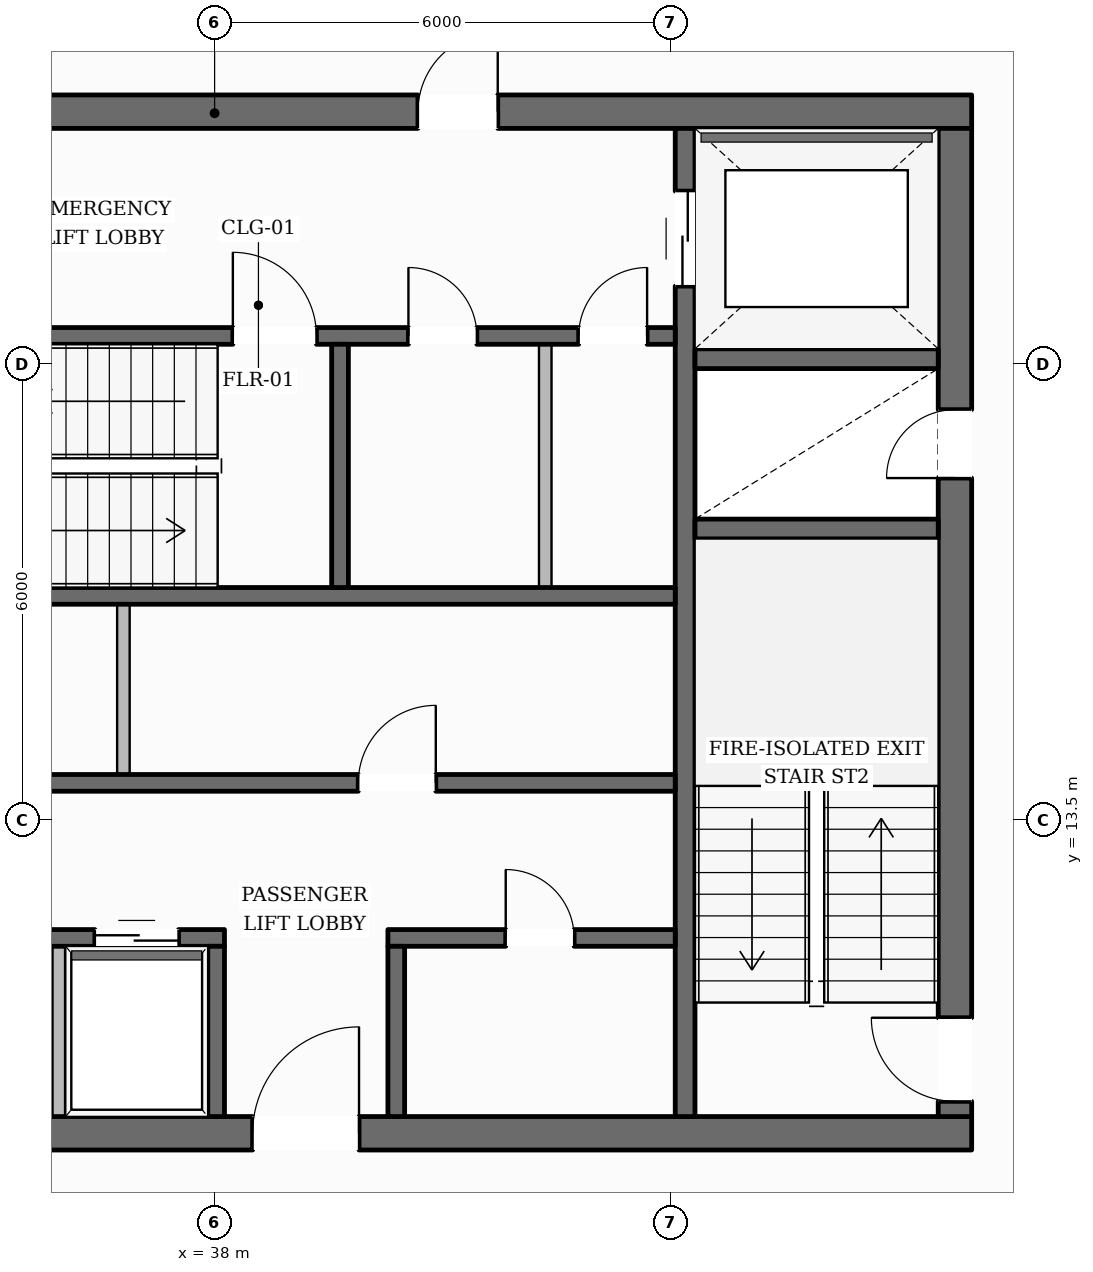
"""IFC4 building model, lengths in metres.
Left out: names, types, materials, properties, quantities, classifications, styles, units other than length and angle.
Written with IfcOpenShell. Run it as: python <this file> out.ifc"""

import sys

from ifc_helpers import new_model, si_unit, direction, frame, frame_2d, origin, place, context, subcontext, project, spatial, rectangle, extrude, element, fill, save


model = new_model("IFC4")
c1 = context("Model", 3, precision=1e-05, world=origin(), true_north=direction((0.0, 1.0)))
c2 = subcontext(c1, "Body", "Model", "MODEL_VIEW")
j1 = project(units=[si_unit("LENGTHUNIT", "METRE"), si_unit("PLANEANGLEUNIT", "RADIAN")], contexts=[c1])
p1 = place(None, origin())
s1 = spatial("IfcSite", under=j1, at=p1, CompositionType="ELEMENT")
p2 = place(p1, origin())
s2 = spatial("IfcBuilding", under=s1, at=p2, CompositionType="ELEMENT")
p3 = place(p2, frame((0.0, 0.0, 180.4)))
s3 = spatial("IfcBuildingStorey", under=s2, at=p3, CompositionType="ELEMENT", Elevation=180.4)
p4 = place(p3, frame((28.04, 9.38, 0.0), z_axis=(0.0, 0.0, 1.0), x_axis=(1.0, 0.0, 0.0)))
e1 = element("IfcWall", 1, at=p4, inside=s3, PredefinedType="SOLIDWALL", context=c2, shape_type="SweptSolid", body=[
    extrude(rectangle(XDim=19.92, YDim=0.44, at=frame_2d((9.96, 0.0))), origin(), (0.0, 0.0, 1.0), 3.6),
])
p5 = place(p4, frame((10.46, 0.0, 0.0)))
e2 = element("IfcOpeningElement", 2, at=p5, cuts=e1, PredefinedType="OPENING", context=c2, shape_type="SweptSolid", body=[
    extrude(rectangle(XDim=1.4, YDim=2.2, at=frame_2d((0.7, 1.1))), frame((0.0, 0.23, 0.0), z_axis=(0.0, -1.0, 0.0), x_axis=(1.0, 0.0, 0.0)), (0.0, 0.0, 1.0), 0.46),
])
p6 = place(p3, frame((28.04, 22.82, 0.0), z_axis=(0.0, 0.0, 1.0), x_axis=(1.0, 0.0, 0.0)))
e3 = element("IfcWall", 3, at=p6, inside=s3, PredefinedType="SOLIDWALL", context=c2, shape_type="SweptSolid", body=[
    extrude(rectangle(XDim=19.92, YDim=0.44, at=frame_2d((9.96, 0.0))), origin(), (0.0, 0.0, 1.0), 3.6),
])
p7 = place(p6, frame((6.235, 0.0, 0.0)))
e4 = element("IfcOpeningElement", 4, at=p7, cuts=e3, PredefinedType="OPENING", context=c2, shape_type="SweptSolid", body=[
    extrude(rectangle(XDim=1.05, YDim=2.15, at=frame_2d((0.525, 1.075))), frame((0.0, 0.23, 0.0), z_axis=(0.0, -1.0, 0.0), x_axis=(1.0, 0.0, 0.0)), (0.0, 0.0, 1.0), 0.46),
])
p8 = place(p6, frame((12.635, 0.0, 0.0)))
e5 = element("IfcOpeningElement", 5, at=p8, cuts=e3, PredefinedType="OPENING", context=c2, shape_type="SweptSolid", body=[
    extrude(rectangle(XDim=1.05, YDim=2.15, at=frame_2d((0.525, 1.075))), frame((0.0, 0.23, 0.0), z_axis=(0.0, -1.0, 0.0), x_axis=(1.0, 0.0, 0.0)), (0.0, 0.0, 1.0), 0.46),
])
p9 = place(p3, frame((47.74, 9.6, 0.0), z_axis=(0.0, 0.0, 1.0), x_axis=(0.0, 1.0, 0.0)))
e6 = element("IfcWall", 6, at=p9, inside=s3, PredefinedType="SOLIDWALL", context=c2, shape_type="SweptSolid", body=[
    extrude(rectangle(XDim=13.0, YDim=0.44, at=frame_2d((6.5, 0.0))), origin(), (0.0, 0.0, 1.0), 3.6),
])
p10 = place(p9, frame((0.2, 0.0, 0.0)))
e7 = element("IfcOpeningElement", 7, at=p10, cuts=e6, PredefinedType="OPENING", context=c2, shape_type="SweptSolid", body=[
    extrude(rectangle(XDim=1.1, YDim=2.15, at=frame_2d((0.55, 1.075))), frame((0.0, 0.23, 0.0), z_axis=(0.0, -1.0, 0.0), x_axis=(1.0, 0.0, 0.0)), (0.0, 0.0, 1.0), 0.46),
])
p11 = place(p9, frame((8.4, 0.0, 0.0)))
e8 = element("IfcOpeningElement", 8, at=p11, cuts=e6, PredefinedType="OPENING", context=c2, shape_type="SweptSolid", body=[
    extrude(rectangle(XDim=0.9, YDim=2.1, at=frame_2d((0.45, 1.05))), frame((0.0, 0.23, 0.0), z_axis=(0.0, -1.0, 0.0), x_axis=(1.0, 0.0, 0.0)), (0.0, 0.0, 1.0), 0.46),
])
p12 = place(p3, frame((44.19, 9.6, 0.0), z_axis=(0.0, 0.0, 1.0), x_axis=(0.0, 1.0, 0.0)))
e9 = element("IfcWall", 9, at=p12, inside=s3, PredefinedType="SHEAR", context=c2, shape_type="SweptSolid", body=[
    extrude(rectangle(XDim=13.0, YDim=0.26, at=frame_2d((6.5, 0.0))), origin(), (0.0, 0.0, 1.0), 3.6),
])
p13 = place(p12, frame((10.925, 0.0, 0.0)))
e10 = element("IfcOpeningElement", 10, at=p13, cuts=e9, PredefinedType="OPENING", context=c2, shape_type="SweptSolid", body=[
    extrude(rectangle(XDim=1.25, YDim=2.25, at=frame_2d((0.625, 1.125))), frame((0.0, 0.14, 0.0), z_axis=(0.0, -1.0, 0.0), x_axis=(1.0, 0.0, 0.0)), (0.0, 0.0, 1.0), 0.28),
])
for number, where, z_axis, x_axis in (
    (11, (44.32, 17.33, 0.0), (0.0, 0.0, 1.0), (1.0, 0.0, 0.0)),
    (12, (44.32, 19.57, 0.0), (0.0, 0.0, 1.0), (1.0, 0.0, 0.0)),
):
    element("IfcWall", number, at=place(p3, frame(where, z_axis=z_axis, x_axis=x_axis)), inside=s3, PredefinedType="SHEAR", context=c2, shape_type="SweptSolid", body=[
        extrude(rectangle(XDim=3.2, YDim=0.26, at=frame_2d((1.6, 0.0))), origin(), (0.0, 0.0, 1.0), 3.6),
    ])
p14 = place(p3, frame((31.94, 19.87, 0.0), z_axis=(0.0, 0.0, 1.0), x_axis=(1.0, 0.0, 0.0)))
e13 = element("IfcWall", 13, at=p14, inside=s3, PredefinedType="SOLIDWALL", context=c2, shape_type="SweptSolid", body=[
    extrude(rectangle(XDim=12.12, YDim=0.22, at=frame_2d((6.06, 0.0))), origin(), (0.0, 0.0, 1.0), 3.6),
])
p15 = place(p14, frame((6.3, 0.0, 0.0)))
e14 = element("IfcOpeningElement", 14, at=p15, cuts=e13, PredefinedType="OPENING", context=c2, shape_type="SweptSolid", body=[
    extrude(rectangle(XDim=1.1, YDim=2.15, at=frame_2d((0.55, 1.075))), frame((0.0, 0.12, 0.0), z_axis=(0.0, -1.0, 0.0), x_axis=(1.0, 0.0, 0.0)), (0.0, 0.0, 1.0), 0.24),
])
p16 = place(p14, frame((8.61, 0.0, 0.0)))
e15 = element("IfcOpeningElement", 15, at=p16, cuts=e13, PredefinedType="OPENING", context=c2, shape_type="SweptSolid", body=[
    extrude(rectangle(XDim=0.9, YDim=2.1, at=frame_2d((0.45, 1.05))), frame((0.0, 0.12, 0.0), z_axis=(0.0, -1.0, 0.0), x_axis=(1.0, 0.0, 0.0)), (0.0, 0.0, 1.0), 0.24),
])
p17 = place(p14, frame((10.85, 0.0, 0.0)))
e16 = element("IfcOpeningElement", 16, at=p17, cuts=e13, PredefinedType="OPENING", context=c2, shape_type="SweptSolid", body=[
    extrude(rectangle(XDim=0.9, YDim=2.1, at=frame_2d((0.45, 1.05))), frame((0.0, 0.12, 0.0), z_axis=(0.0, -1.0, 0.0), x_axis=(1.0, 0.0, 0.0)), (0.0, 0.0, 1.0), 0.24),
])
p18 = place(p3, frame((31.94, 16.45, 0.0), z_axis=(0.0, 0.0, 1.0), x_axis=(1.0, 0.0, 0.0)))
e17 = element("IfcWall", 17, at=p18, inside=s3, PredefinedType="SOLIDWALL", context=c2, shape_type="SweptSolid", body=[
    extrude(rectangle(XDim=12.12, YDim=0.22, at=frame_2d((6.06, 0.0))), origin(), (0.0, 0.0, 1.0), 3.6),
])
p19 = place(p3, frame((39.65, 16.56, 0.0), z_axis=(0.0, 0.0, 1.0), x_axis=(0.0, 1.0, 0.0)))
e18 = element("IfcWall", 18, at=p19, inside=s3, PredefinedType="SOLIDWALL", context=c2, shape_type="SweptSolid", body=[
    extrude(rectangle(XDim=3.2, YDim=0.22, at=frame_2d((1.6, 0.0))), origin(), (0.0, 0.0, 1.0), 3.6),
])
p20 = place(p3, frame((31.94, 13.99, 0.0), z_axis=(0.0, 0.0, 1.0), x_axis=(1.0, 0.0, 0.0)))
e19 = element("IfcWall", 19, at=p20, inside=s3, PredefinedType="SOLIDWALL", context=c2, shape_type="SweptSolid", body=[
    extrude(rectangle(XDim=12.12, YDim=0.22, at=frame_2d((6.06, 0.0))), origin(), (0.0, 0.0, 1.0), 3.6),
])
p21 = place(p20, frame((1.91, 0.0, 0.0)))
e20 = element("IfcOpeningElement", 20, at=p21, cuts=e19, PredefinedType="OPENING", context=c2, shape_type="SweptSolid", body=[
    extrude(rectangle(XDim=0.9, YDim=2.1, at=frame_2d((0.45, 1.05))), frame((0.0, 0.12, 0.0), z_axis=(0.0, -1.0, 0.0), x_axis=(1.0, 0.0, 0.0)), (0.0, 0.0, 1.0), 0.24),
])
p22 = place(p20, frame((7.95, 0.0, 0.0)))
e21 = element("IfcOpeningElement", 21, at=p22, cuts=e19, PredefinedType="OPENING", context=c2, shape_type="SweptSolid", body=[
    extrude(rectangle(XDim=1.02, YDim=2.15, at=frame_2d((0.51, 1.075))), frame((0.0, 0.12, 0.0), z_axis=(0.0, -1.0, 0.0), x_axis=(1.0, 0.0, 0.0)), (0.0, 0.0, 1.0), 0.24),
])
p23 = place(p3, frame((31.94, 11.95, 0.0), z_axis=(0.0, 0.0, 1.0), x_axis=(1.0, 0.0, 0.0)))
e22 = element("IfcWall", 22, at=p23, inside=s3, PredefinedType="SOLIDWALL", context=c2, shape_type="SweptSolid", body=[
    extrude(rectangle(XDim=6.19, YDim=0.22, at=frame_2d((3.095, 0.0))), origin(), (0.0, 0.0, 1.0), 3.6),
])
p24 = place(p23, frame((0.385, 0.0, 0.0)))
e23 = element("IfcOpeningElement", 23, at=p24, cuts=e22, PredefinedType="OPENING", context=c2, shape_type="SweptSolid", body=[
    extrude(rectangle(XDim=1.1, YDim=2.2, at=frame_2d((0.55, 1.1))), frame((0.0, 0.12, 0.0), z_axis=(0.0, -1.0, 0.0), x_axis=(1.0, 0.0, 0.0)), (0.0, 0.0, 1.0), 0.24),
])
p25 = place(p23, frame((2.435, 0.0, 0.0)))
e24 = element("IfcOpeningElement", 24, at=p25, cuts=e22, PredefinedType="OPENING", context=c2, shape_type="SweptSolid", body=[
    extrude(rectangle(XDim=1.1, YDim=2.2, at=frame_2d((0.55, 1.1))), frame((0.0, 0.12, 0.0), z_axis=(0.0, -1.0, 0.0), x_axis=(1.0, 0.0, 0.0)), (0.0, 0.0, 1.0), 0.24),
])
p26 = place(p23, frame((4.485, 0.0, 0.0)))
e25 = element("IfcOpeningElement", 25, at=p26, cuts=e22, PredefinedType="OPENING", context=c2, shape_type="SweptSolid", body=[
    extrude(rectangle(XDim=1.1, YDim=2.2, at=frame_2d((0.55, 1.1))), frame((0.0, 0.12, 0.0), z_axis=(0.0, -1.0, 0.0), x_axis=(1.0, 0.0, 0.0)), (0.0, 0.0, 1.0), 0.24),
])
p27 = place(p3, frame((40.28, 11.95, 0.0), z_axis=(0.0, 0.0, 1.0), x_axis=(1.0, 0.0, 0.0)))
e26 = element("IfcWall", 26, at=p27, inside=s3, PredefinedType="SOLIDWALL", context=c2, shape_type="SweptSolid", body=[
    extrude(rectangle(XDim=3.78, YDim=0.22, at=frame_2d((1.89, 0.0))), origin(), (0.0, 0.0, 1.0), 3.6),
])
p28 = place(p27, frame((1.55, 0.0, 0.0)))
e27 = element("IfcOpeningElement", 27, at=p28, cuts=e26, PredefinedType="OPENING", context=c2, shape_type="SweptSolid", body=[
    extrude(rectangle(XDim=0.9, YDim=2.1, at=frame_2d((0.45, 1.05))), frame((0.0, 0.12, 0.0), z_axis=(0.0, -1.0, 0.0), x_axis=(1.0, 0.0, 0.0)), (0.0, 0.0, 1.0), 0.24),
])
for number, where, z_axis, x_axis in (
    (28, (38.02, 9.6, 0.0), (0.0, 0.0, 1.0), (0.0, 1.0, 0.0)),
    (29, (40.39, 9.6, 0.0), (0.0, 0.0, 1.0), (0.0, 1.0, 0.0)),
):
    element("IfcWall", number, at=place(p3, frame(where, z_axis=z_axis, x_axis=x_axis)), inside=s3, PredefinedType="SOLIDWALL", context=c2, shape_type="SweptSolid", body=[
        extrude(rectangle(XDim=2.24, YDim=0.22, at=frame_2d((1.12, 0.0))), origin(), (0.0, 0.0, 1.0), 3.6),
    ])
p29 = place(p3, frame((42.575, 44.272, 0.0), z_axis=(0.0, 0.0, 1.0), x_axis=(0.503934681705, -0.863741764982, 0.0)))
e30 = element("IfcWall", 30, at=p29, inside=s3, PredefinedType="STANDARD", context=c2, shape_type="SweptSolid", body=[
    extrude(rectangle(XDim=37.915, YDim=0.35, at=frame_2d((18.958, 0.0))), origin(), (0.0, 0.0, 1.0), 3.132),
])
p30 = place(p29, frame((33.633, 0.0, 0.65)))
e31 = element("IfcOpeningElement", 31, at=p30, cuts=e30, PredefinedType="OPENING", context=c2, shape_type="SweptSolid", body=[
    extrude(rectangle(XDim=1.45, YDim=1.75, at=frame_2d((0.725, 0.875))), frame((0.0, 0.185, 0.0), z_axis=(0.0, -1.0, 0.0), x_axis=(1.0, 0.0, 0.0)), (0.0, 0.0, 1.0), 0.37),
])
p31 = place(p29, frame((27.472, 0.0, 0.65)))
e32 = element("IfcOpeningElement", 32, at=p31, cuts=e30, PredefinedType="OPENING", context=c2, shape_type="SweptSolid", body=[
    extrude(rectangle(XDim=1.45, YDim=1.75, at=frame_2d((0.725, 0.875))), frame((0.0, 0.185, 0.0), z_axis=(0.0, -1.0, 0.0), x_axis=(1.0, 0.0, 0.0)), (0.0, 0.0, 1.0), 0.37),
])
p32 = place(p29, frame((15.15, 0.0, 0.65)))
e33 = element("IfcOpeningElement", 33, at=p32, cuts=e30, PredefinedType="OPENING", context=c2, shape_type="SweptSolid", body=[
    extrude(rectangle(XDim=1.45, YDim=1.75, at=frame_2d((0.725, 0.875))), frame((0.0, 0.185, 0.0), z_axis=(0.0, -1.0, 0.0), x_axis=(1.0, 0.0, 0.0)), (0.0, 0.0, 1.0), 0.37),
])
p33 = place(p29, frame((8.989, 0.0, 0.65)))
e34 = element("IfcOpeningElement", 34, at=p33, cuts=e30, PredefinedType="OPENING", context=c2, shape_type="SweptSolid", body=[
    extrude(rectangle(XDim=1.45, YDim=1.75, at=frame_2d((0.725, 0.875))), frame((0.0, 0.185, 0.0), z_axis=(0.0, -1.0, 0.0), x_axis=(1.0, 0.0, 0.0)), (0.0, 0.0, 1.0), 0.37),
])
p34 = place(p29, frame((2.828, 0.0, 0.65)))
e35 = element("IfcOpeningElement", 35, at=p34, cuts=e30, PredefinedType="OPENING", context=c2, shape_type="SweptSolid", body=[
    extrude(rectangle(XDim=1.45, YDim=1.75, at=frame_2d((0.725, 0.875))), frame((0.0, 0.185, 0.0), z_axis=(0.0, -1.0, 0.0), x_axis=(1.0, 0.0, 0.0)), (0.0, 0.0, 1.0), 0.37),
])
p35 = place(p3, frame((35.95, 9.52, 0.0), z_axis=(0.0, 0.0, 1.0), x_axis=(0.0, 1.0, 0.0)))
e36 = element("IfcWall", 36, at=p35, inside=s3, PredefinedType="PARTITIONING", context=c2, shape_type="SweptSolid", body=[
    extrude(rectangle(XDim=2.32, YDim=0.165, at=frame_2d((1.16, 0.0))), origin(), (0.0, 0.0, 1.0), 3.6),
])
p36 = place(p3, frame((36.8, 14.1, 0.0), z_axis=(0.0, 0.0, 1.0), x_axis=(0.0, 1.0, 0.0)))
e37 = element("IfcWall", 37, at=p36, inside=s3, PredefinedType="PARTITIONING", context=c2, shape_type="SweptSolid", body=[
    extrude(rectangle(XDim=2.24, YDim=0.165, at=frame_2d((1.12, 0.0))), origin(), (0.0, 0.0, 1.0), 3.6),
])
p37 = place(p3, frame((42.35, 16.56, 0.0), z_axis=(0.0, 0.0, 1.0), x_axis=(0.0, 1.0, 0.0)))
e38 = element("IfcWall", 38, at=p37, inside=s3, PredefinedType="PARTITIONING", context=c2, shape_type="SweptSolid", body=[
    extrude(rectangle(XDim=3.2, YDim=0.165, at=frame_2d((1.6, 0.0))), origin(), (0.0, 0.0, 1.0), 3.6),
])
p38 = place(p10, origin())
e39 = element("IfcDoor", 39, at=p38, inside=s3, OperationType="SINGLE_SWING_RIGHT", PredefinedType="DOOR", context=c2, shape_type="SweptSolid", body=[
    extrude(rectangle(XDim=1.1, YDim=2.15, at=frame_2d((0.55, 1.075))), frame((0.0, 0.025, 0.0), z_axis=(0.0, -1.0, 0.0), x_axis=(1.0, 0.0, 0.0)), (0.0, 0.0, 1.0), 0.05),
])
fill(e7, e39)
p39 = place(p15, origin())
e40 = element("IfcDoor", 40, at=p39, inside=s3, OperationType="SINGLE_SWING_LEFT", PredefinedType="DOOR", context=c2, shape_type="SweptSolid", body=[
    extrude(rectangle(XDim=1.1, YDim=2.15, at=frame_2d((0.55, 1.075))), frame((0.0, 0.025, 0.0), z_axis=(0.0, -1.0, 0.0), x_axis=(1.0, 0.0, 0.0)), (0.0, 0.0, 1.0), 0.05),
])
fill(e14, e40)
p40 = place(p11, origin())
e41 = element("IfcDoor", 41, at=p40, inside=s3, OperationType="SINGLE_SWING_LEFT", PredefinedType="DOOR", context=c2, shape_type="SweptSolid", body=[
    extrude(rectangle(XDim=0.9, YDim=2.1, at=frame_2d((0.45, 1.05))), frame((0.0, 0.025, 0.0), z_axis=(0.0, -1.0, 0.0), x_axis=(1.0, 0.0, 0.0)), (0.0, 0.0, 1.0), 0.05),
])
fill(e8, e41)
p41 = place(p8, origin())
e42 = element("IfcDoor", 42, at=p41, inside=s3, OperationType="SINGLE_SWING_RIGHT", PredefinedType="DOOR", context=c2, shape_type="SweptSolid", body=[
    extrude(rectangle(XDim=1.05, YDim=2.15, at=frame_2d((0.525, 1.075))), frame((0.0, 0.025, 0.0), z_axis=(0.0, -1.0, 0.0), x_axis=(1.0, 0.0, 0.0)), (0.0, 0.0, 1.0), 0.05),
])
fill(e5, e42)
p42 = place(p13, origin())
e43 = element("IfcDoor", 43, at=p42, inside=s3, OperationType="DOUBLE_DOOR_SLIDING", PredefinedType="DOOR", context=c2, shape_type="SweptSolid", body=[
    extrude(rectangle(XDim=1.25, YDim=2.25, at=frame_2d((0.625, 1.125))), frame((0.0, 0.025, 0.0), z_axis=(0.0, -1.0, 0.0), x_axis=(1.0, 0.0, 0.0)), (0.0, 0.0, 1.0), 0.05),
])
fill(e10, e43)
p43 = place(p5, origin())
e44 = element("IfcDoor", 44, at=p43, inside=s3, OperationType="SINGLE_SWING_RIGHT", PredefinedType="DOOR", context=c2, shape_type="SweptSolid", body=[
    extrude(rectangle(XDim=1.4, YDim=2.2, at=frame_2d((0.7, 1.1))), frame((0.0, 0.025, 0.0), z_axis=(0.0, -1.0, 0.0), x_axis=(1.0, 0.0, 0.0)), (0.0, 0.0, 1.0), 0.05),
])
fill(e2, e44)
p44 = place(p26, origin())
e45 = element("IfcDoor", 45, at=p44, inside=s3, OperationType="DOUBLE_DOOR_SLIDING", PredefinedType="DOOR", context=c2, shape_type="SweptSolid", body=[
    extrude(rectangle(XDim=1.1, YDim=2.2, at=frame_2d((0.55, 1.1))), frame((0.0, 0.025, 0.0), z_axis=(0.0, -1.0, 0.0), x_axis=(1.0, 0.0, 0.0)), (0.0, 0.0, 1.0), 0.05),
])
fill(e25, e45)
p45 = place(p22, origin())
e46 = element("IfcDoor", 46, at=p45, inside=s3, OperationType="SINGLE_SWING_RIGHT", PredefinedType="DOOR", context=c2, shape_type="SweptSolid", body=[
    extrude(rectangle(XDim=1.02, YDim=2.15, at=frame_2d((0.51, 1.075))), frame((0.0, 0.025, 0.0), z_axis=(0.0, -1.0, 0.0), x_axis=(1.0, 0.0, 0.0)), (0.0, 0.0, 1.0), 0.05),
])
fill(e21, e46)
p46 = place(p16, origin())
e47 = element("IfcDoor", 47, at=p46, inside=s3, OperationType="SINGLE_SWING_LEFT", PredefinedType="DOOR", context=c2, shape_type="SweptSolid", body=[
    extrude(rectangle(XDim=0.9, YDim=2.1, at=frame_2d((0.45, 1.05))), frame((0.0, 0.025, 0.0), z_axis=(0.0, -1.0, 0.0), x_axis=(1.0, 0.0, 0.0)), (0.0, 0.0, 1.0), 0.05),
])
fill(e15, e47)
p47 = place(p17, origin())
e48 = element("IfcDoor", 48, at=p47, inside=s3, OperationType="SINGLE_SWING_RIGHT", PredefinedType="DOOR", context=c2, shape_type="SweptSolid", body=[
    extrude(rectangle(XDim=0.9, YDim=2.1, at=frame_2d((0.45, 1.05))), frame((0.0, 0.025, 0.0), z_axis=(0.0, -1.0, 0.0), x_axis=(1.0, 0.0, 0.0)), (0.0, 0.0, 1.0), 0.05),
])
fill(e16, e48)
p48 = place(p28, origin())
e49 = element("IfcDoor", 49, at=p48, inside=s3, OperationType="SINGLE_SWING_LEFT", PredefinedType="DOOR", context=c2, shape_type="SweptSolid", body=[
    extrude(rectangle(XDim=0.9, YDim=2.1, at=frame_2d((0.45, 1.05))), frame((0.0, 0.025, 0.0), z_axis=(0.0, -1.0, 0.0), x_axis=(1.0, 0.0, 0.0)), (0.0, 0.0, 1.0), 0.05),
])
fill(e27, e49)
save(model, sys.argv[1])
